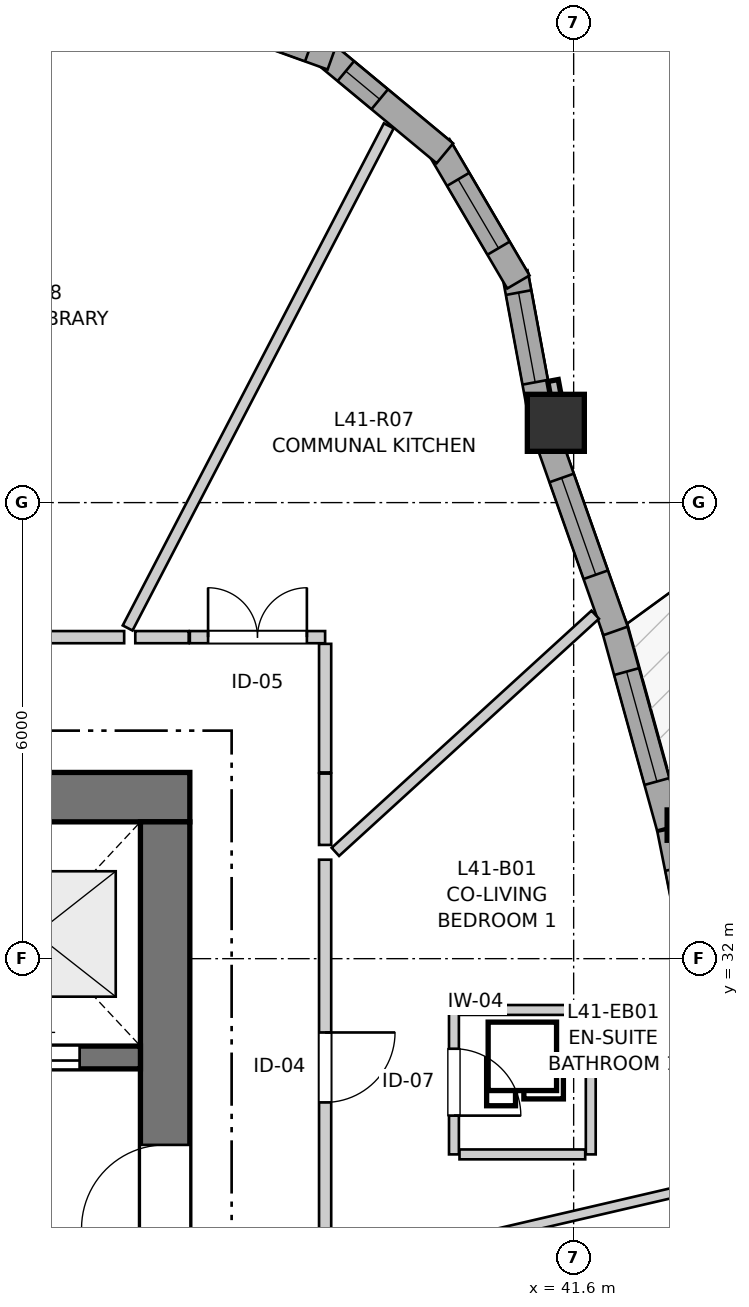
"""IFC4 building model, lengths in metres.
Left out: names, types, materials, properties, quantities, classifications, styles, units other than length and angle.
Written with IfcOpenShell. Run it as: python <this file> out.ifc"""

import sys

from ifc_helpers import new_model, si_unit, direction, frame, frame_2d, origin, origin_2d, place, context, subcontext, project, spatial, rectangle, i_section, extrude, source, transform, mapped, element, fill, save


model = new_model("IFC4")
c1 = context("Model", 3, precision=1e-05, world=origin(), true_north=direction((0.0, 1.0)))
c2 = subcontext(c1, "Body", "Model", "MODEL_VIEW")
j1 = project(units=[si_unit("LENGTHUNIT", "METRE"), si_unit("PLANEANGLEUNIT", "RADIAN")], contexts=[c1])
p1 = place(None, origin())
s1 = spatial("IfcSite", under=j1, at=p1, CompositionType="ELEMENT")
p2 = place(p1, origin())
s2 = spatial("IfcBuilding", under=s1, at=p2, CompositionType="ELEMENT")
p3 = place(p2, frame((0.0, 0.0, 139.4)))
s3 = spatial("IfcBuildingStorey", under=s2, at=p3, CompositionType="ELEMENT", Elevation=139.4)
p4 = place(p3, frame((36.55, 34.125, 0.0), z_axis=(0.0, 0.0, 1.0), x_axis=(-1.0, 0.0, 0.0)))
e1 = element("IfcWall", 1, at=p4, inside=s3, PredefinedType="SHEAR", context=c2, shape_type="SweptSolid", body=[
    extrude(rectangle(XDim=12.4, YDim=0.65, at=frame_2d((6.2, 0.0))), origin(), (0.0, 0.0, 1.0), 2.95),
])
p5 = place(p3, frame((36.225, 18.2, 0.0), z_axis=(0.0, 0.0, 1.0), x_axis=(0.0, 1.0, 0.0)))
e2 = element("IfcWall", 2, at=p5, inside=s3, PredefinedType="SHEAR", context=c2, shape_type="SweptSolid", body=[
    extrude(rectangle(XDim=15.6, YDim=0.65, at=frame_2d((7.8, 0.0))), origin(), (0.0, 0.0, 1.0), 2.95),
])
p6 = place(p5, frame((4.25, 0.0, 0.0)))
e3 = element("IfcOpeningElement", 3, at=p6, cuts=e2, PredefinedType="OPENING", context=c2, shape_type="SweptSolid", body=[
    extrude(rectangle(XDim=1.1, YDim=2.15, at=frame_2d((0.55, 1.075))), frame((0.0, 0.335, 0.0), z_axis=(0.0, -1.0, 0.0), x_axis=(1.0, 0.0, 0.0)), (0.0, 0.0, 1.0), 0.67),
])
p7 = place(p5, frame((10.25, 0.0, 0.0)))
e4 = element("IfcOpeningElement", 4, at=p7, cuts=e2, PredefinedType="OPENING", context=c2, shape_type="SweptSolid", body=[
    extrude(rectangle(XDim=1.1, YDim=2.15, at=frame_2d((0.55, 1.075))), frame((0.0, 0.335, 0.0), z_axis=(0.0, -1.0, 0.0), x_axis=(1.0, 0.0, 0.0)), (0.0, 0.0, 1.0), 0.67),
])
p8 = place(p3, frame((24.8, 30.7, 0.0), z_axis=(0.0, 0.0, 1.0), x_axis=(1.0, 0.0, 0.0)))
e5 = element("IfcWall", 5, at=p8, inside=s3, PredefinedType="SHEAR", context=c2, shape_type="SweptSolid", body=[
    extrude(rectangle(XDim=11.1, YDim=0.3, at=frame_2d((5.55, 0.0))), origin(), (0.0, 0.0, 1.0), 2.95),
])
p9 = place(p8, frame((6.22, 0.0, 0.0)))
e6 = element("IfcOpeningElement", 6, at=p9, cuts=e5, PredefinedType="OPENING", context=c2, shape_type="SweptSolid", body=[
    extrude(rectangle(XDim=0.98, YDim=2.15, at=frame_2d((0.49, 1.075))), frame((0.0, 0.16, 0.0), z_axis=(0.0, -1.0, 0.0), x_axis=(1.0, 0.0, 0.0)), (0.0, 0.0, 1.0), 0.32),
])
p10 = place(p8, frame((9.15, 0.0, 0.0)))
e7 = element("IfcOpeningElement", 7, at=p10, cuts=e5, PredefinedType="OPENING", context=c2, shape_type="SweptSolid", body=[
    extrude(rectangle(XDim=1.15, YDim=2.15, at=frame_2d((0.575, 1.075))), frame((0.0, 0.16, 0.0), z_axis=(0.0, -1.0, 0.0), x_axis=(1.0, 0.0, 0.0)), (0.0, 0.0, 1.0), 0.32),
])
m1 = source(origin(), c2, "Body", "SweptSolid", [
    extrude(i_section(OverallWidth=0.401, OverallDepth=0.399, WebThickness=0.023, FlangeThickness=0.036, FilletRadius=0.015, at=origin_2d()), origin(), (0.0, 0.0, 1.0), 2.95),
])
p11 = place(p3, frame((43.031, 33.757, 0.0), z_axis=(0.0, 0.0, 1.0), x_axis=(1.0, 0.0, 0.0)))
e8 = element("IfcColumn", 8, at=p11, inside=s3, PredefinedType="PILASTER", context=c2, shape_type="MappedRepresentation", body=[
    mapped(m1, transform((0.0, 0.0, 0.0), x_axis=(1.0, 0.0, 0.0), y_axis=(0.0, 1.0, 0.0), z_axis=(0.0, 0.0, 1.0), scale=1.0)),
])
m2 = source(origin(), c2, "Body", "SweptSolid", [
    extrude(rectangle(XDim=0.75, YDim=0.75, at=origin_2d()), origin(), (0.0, 0.0, 1.0), 2.95),
])
p12 = place(p3, frame((41.365, 39.05, 0.0), z_axis=(0.0, 0.0, 1.0), x_axis=(1.0, 0.0, 0.0)))
e9 = element("IfcColumn", 9, at=p12, inside=s3, PredefinedType="COLUMN", context=c2, shape_type="MappedRepresentation", body=[
    mapped(m2, transform((0.0, 0.0, 0.0), x_axis=(1.0, 0.0, 0.0), y_axis=(0.0, 1.0, 0.0), z_axis=(0.0, 0.0, 1.0), scale=1.0)),
])
p13 = place(p3, frame((43.401, 31.037, 0.0), z_axis=(0.0, 0.0, 1.0), x_axis=(-0.196047084538, 0.980594483283, 0.0)))
e10 = element("IfcWall", 10, at=p13, inside=s3, PredefinedType="SOLIDWALL", context=c2, shape_type="SweptSolid", body=[
    extrude(rectangle(XDim=2.72, YDim=0.34, at=frame_2d((1.36, 0.0))), origin(), (0.0, 0.0, 1.0), 2.53),
])
p14 = place(p13, frame((0.545, 0.0, 0.82)))
e11 = element("IfcOpeningElement", 11, at=p14, cuts=e10, PredefinedType="OPENING", context=c2, shape_type="SweptSolid", body=[
    extrude(rectangle(XDim=1.65, YDim=1.45, at=frame_2d((0.825, 0.725))), frame((0.0, 0.18, 0.0), z_axis=(0.0, -1.0, 0.0), x_axis=(1.0, 0.0, 0.0)), (0.0, 0.0, 1.0), 0.36),
])
p15 = place(p3, frame((42.861, 33.731, 0.0), z_axis=(0.0, 0.0, 1.0), x_axis=(-0.266277078362, 0.96389652844, 0.0)))
e12 = element("IfcWall", 12, at=p15, inside=s3, PredefinedType="SOLIDWALL", context=c2, shape_type="SweptSolid", body=[
    extrude(rectangle(XDim=2.764, YDim=0.34, at=frame_2d((1.382, 0.0))), origin(), (0.0, 0.0, 1.0), 2.53),
])
p16 = place(p15, frame((0.622, 0.0, 0.82)))
e13 = element("IfcOpeningElement", 13, at=p16, cuts=e12, PredefinedType="OPENING", context=c2, shape_type="SweptSolid", body=[
    extrude(rectangle(XDim=1.5, YDim=1.45, at=frame_2d((0.75, 0.725))), frame((0.0, 0.18, 0.0), z_axis=(0.0, -1.0, 0.0), x_axis=(1.0, 0.0, 0.0)), (0.0, 0.0, 1.0), 0.36),
])
p17 = place(p3, frame((42.151, 36.312, 0.0), z_axis=(0.0, 0.0, 1.0), x_axis=(-0.332691841861, 0.94303559761, 0.0)))
e14 = element("IfcWall", 14, at=p17, inside=s3, PredefinedType="SOLIDWALL", context=c2, shape_type="SweptSolid", body=[
    extrude(rectangle(XDim=2.688, YDim=0.34, at=frame_2d((1.344, 0.0))), origin(), (0.0, 0.0, 1.0), 2.53),
])
p18 = place(p17, frame((0.784, 0.0, 0.82)))
e15 = element("IfcOpeningElement", 15, at=p18, cuts=e14, PredefinedType="OPENING", context=c2, shape_type="SweptSolid", body=[
    extrude(rectangle(XDim=1.35, YDim=1.45, at=frame_2d((0.675, 0.725))), frame((0.0, 0.18, 0.0), z_axis=(0.0, -1.0, 0.0), x_axis=(1.0, 0.0, 0.0)), (0.0, 0.0, 1.0), 0.36),
])
p19 = place(p3, frame((41.17, 39.171, 0.0), z_axis=(0.0, 0.0, 1.0), x_axis=(-0.182297593262, 0.983243401956, 0.0)))
e16 = element("IfcWall", 16, at=p19, inside=s3, PredefinedType="SOLIDWALL", context=c2, shape_type="SweptSolid", body=[
    extrude(rectangle(XDim=1.888, YDim=0.34, at=frame_2d((0.944, 0.0))), origin(), (0.0, 0.0, 1.0), 2.53),
])
p20 = place(p19, frame((0.419, 0.0, 0.82)))
e17 = element("IfcOpeningElement", 17, at=p20, cuts=e16, PredefinedType="OPENING", context=c2, shape_type="SweptSolid", body=[
    extrude(rectangle(XDim=1.2, YDim=1.45, at=frame_2d((0.6, 0.725))), frame((0.0, 0.18, 0.0), z_axis=(0.0, -1.0, 0.0), x_axis=(1.0, 0.0, 0.0)), (0.0, 0.0, 1.0), 0.36),
])
p21 = place(p3, frame((40.873, 40.902, 0.0), z_axis=(0.0, 0.0, 1.0), x_axis=(-0.506225227923, 0.862401309493, 0.0)))
e18 = element("IfcWall", 18, at=p21, inside=s3, PredefinedType="SOLIDWALL", context=c2, shape_type="SweptSolid", body=[
    extrude(rectangle(XDim=2.081, YDim=0.34, at=frame_2d((1.041, 0.0))), origin(), (0.0, 0.0, 1.0), 2.53),
])
p22 = place(p21, frame((0.516, 0.0, 0.82)))
e19 = element("IfcOpeningElement", 19, at=p22, cuts=e18, PredefinedType="OPENING", context=c2, shape_type="SweptSolid", body=[
    extrude(rectangle(XDim=1.05, YDim=1.45, at=frame_2d((0.525, 0.725))), frame((0.0, 0.18, 0.0), z_axis=(0.0, -1.0, 0.0), x_axis=(1.0, 0.0, 0.0)), (0.0, 0.0, 1.0), 0.36),
])
p23 = place(p3, frame((39.906, 42.595, 0.0), z_axis=(0.0, 0.0, 1.0), x_axis=(-0.769584999316, 0.638544382817, 0.0)))
e20 = element("IfcWall", 20, at=p23, inside=s3, PredefinedType="SOLIDWALL", context=c2, shape_type="SweptSolid", body=[
    extrude(rectangle(XDim=2.081, YDim=0.34, at=frame_2d((1.041, 0.0))), origin(), (0.0, 0.0, 1.0), 2.53),
])
p24 = place(p23, frame((1.114, 0.0, 0.82)))
e21 = element("IfcOpeningElement", 21, at=p24, cuts=e20, PredefinedType="OPENING", context=c2, shape_type="SweptSolid", body=[
    extrude(rectangle(XDim=0.58, YDim=1.35, at=frame_2d((0.29, 0.675))), frame((0.0, 0.18, 0.0), z_axis=(0.0, -1.0, 0.0), x_axis=(1.0, 0.0, 0.0)), (0.0, 0.0, 1.0), 0.36),
])
p25 = place(p3, frame((38.42, 43.858, 0.0), z_axis=(0.0, 0.0, 1.0), x_axis=(-0.941071215914, 0.338208466153, 0.0)))
e22 = element("IfcWall", 22, at=p25, inside=s3, PredefinedType="SOLIDWALL", context=c2, shape_type="SweptSolid", body=[
    extrude(rectangle(XDim=2.081, YDim=0.34, at=frame_2d((1.041, 0.0))), origin(), (0.0, 0.0, 1.0), 2.53),
])
p26 = place(p25, frame((0.316, 0.0, 0.82)))
e23 = element("IfcOpeningElement", 23, at=p26, cuts=e22, PredefinedType="OPENING", context=c2, shape_type="SweptSolid", body=[
    extrude(rectangle(XDim=1.45, YDim=1.25, at=frame_2d((0.725, 0.625))), frame((0.0, 0.18, 0.0), z_axis=(0.0, -1.0, 0.0), x_axis=(1.0, 0.0, 0.0)), (0.0, 0.0, 1.0), 0.36),
])
p27 = place(p3, frame((30.078, 36.23, 0.0), z_axis=(0.0, 0.0, 1.0), x_axis=(1.0, 0.0, 0.0)))
e24 = element("IfcWall", 24, at=p27, inside=s3, PredefinedType="PARTITIONING", context=c2, shape_type="SweptSolid", body=[
    extrude(rectangle(XDim=5.608, YDim=0.16, at=frame_2d((2.804, 0.0))), origin(), (0.0, 0.0, 1.0), 2.588),
])
p28 = place(p27, frame((2.323, 0.0, 0.0)))
e25 = element("IfcOpeningElement", 25, at=p28, cuts=e24, PredefinedType="OPENING", context=c2, shape_type="SweptSolid", body=[
    extrude(rectangle(XDim=0.96, YDim=2.1, at=frame_2d((0.48, 1.05))), frame((0.0, 0.09, 0.0), z_axis=(0.0, -1.0, 0.0), x_axis=(1.0, 0.0, 0.0)), (0.0, 0.0, 1.0), 0.18),
])
p29 = place(p3, frame((38.33, 33.302, 0.0), z_axis=(0.0, 0.0, 1.0), x_axis=(0.0, -1.0, 0.0)))
e26 = element("IfcWall", 26, at=p29, inside=s3, PredefinedType="PARTITIONING", context=c2, shape_type="SweptSolid", body=[
    extrude(rectangle(XDim=5.462, YDim=0.16, at=frame_2d((2.731, 0.0))), origin(), (0.0, 0.0, 1.0), 2.588),
])
p30 = place(p29, frame((2.273, 0.0, 0.0)))
e27 = element("IfcOpeningElement", 27, at=p30, cuts=e26, PredefinedType="OPENING", context=c2, shape_type="SweptSolid", body=[
    extrude(rectangle(XDim=0.92, YDim=2.1, at=frame_2d((0.46, 1.05))), frame((0.0, 0.09, 0.0), z_axis=(0.0, -1.0, 0.0), x_axis=(1.0, 0.0, 0.0)), (0.0, 0.0, 1.0), 0.18),
])
p31 = place(p3, frame((40.025, 31.325, 0.0), z_axis=(0.0, 0.0, 1.0), x_axis=(0.0, -1.0, 0.0)))
e28 = element("IfcWall", 28, at=p31, inside=s3, PredefinedType="PARTITIONING", context=c2, shape_type="SweptSolid", body=[
    extrude(rectangle(XDim=1.9, YDim=0.13, at=frame_2d((0.95, 0.0))), origin(), (0.0, 0.0, 1.0), 2.95),
])
p32 = place(p31, frame((0.51, 0.0, 0.0)))
e29 = element("IfcOpeningElement", 29, at=p32, cuts=e28, PredefinedType="OPENING", context=c2, shape_type="SweptSolid", body=[
    extrude(rectangle(XDim=0.88, YDim=2.05, at=frame_2d((0.44, 1.025))), frame((0.0, 0.075, 0.0), z_axis=(0.0, -1.0, 0.0), x_axis=(1.0, 0.0, 0.0)), (0.0, 0.0, 1.0), 0.15),
])
p33 = place(p3, frame((36.55, 36.23, 0.0), z_axis=(0.0, 0.0, 1.0), x_axis=(1.0, 0.0, 0.0)))
e30 = element("IfcWall", 30, at=p33, inside=s3, PredefinedType="PARTITIONING", context=c2, shape_type="SweptSolid", body=[
    extrude(rectangle(XDim=1.78, YDim=0.16, at=frame_2d((0.89, 0.0))), origin(), (0.0, 0.0, 1.0), 2.95),
])
p34 = place(p33, frame((0.24, 0.0, 0.0)))
e31 = element("IfcOpeningElement", 31, at=p34, cuts=e30, PredefinedType="OPENING", context=c2, shape_type="SweptSolid", body=[
    extrude(rectangle(XDim=1.3, YDim=2.1, at=frame_2d((0.65, 1.05))), frame((0.0, 0.09, 0.0), z_axis=(0.0, -1.0, 0.0), x_axis=(1.0, 0.0, 0.0)), (0.0, 0.0, 1.0), 0.18),
])
p35 = place(p3, frame((35.732, 36.351, 0.0), z_axis=(0.0, 0.0, 1.0), x_axis=(0.461386804, 0.887199085378, 0.0)))
e32 = element("IfcWall", 32, at=p35, inside=s3, PredefinedType="PARTITIONING", context=c2, shape_type="SweptSolid", body=[
    extrude(rectangle(XDim=7.446, YDim=0.145, at=frame_2d((3.723, 0.0))), origin(), (0.0, 0.0, 1.0), 2.95),
])
p36 = place(p3, frame((38.433, 27.88, 0.0), z_axis=(0.0, 0.0, 1.0), x_axis=(0.974013368575, 0.226490524828, 0.0)))
e33 = element("IfcWall", 33, at=p36, inside=s3, PredefinedType="PARTITIONING", context=c2, shape_type="SweptSolid", body=[
    extrude(rectangle(XDim=5.159, YDim=0.13, at=frame_2d((2.58, 0.0))), origin(), (0.0, 0.0, 1.0), 2.95),
])
p37 = place(p3, frame((38.465, 33.405, 0.0), z_axis=(0.0, 0.0, 1.0), x_axis=(0.738623645331, 0.674118024205, 0.0)))
e34 = element("IfcWall", 34, at=p37, inside=s3, PredefinedType="PARTITIONING", context=c2, shape_type="SweptSolid", body=[
    extrude(rectangle(XDim=4.629, YDim=0.145, at=frame_2d((2.314, 0.0))), origin(), (0.0, 0.0, 1.0), 2.95),
])
p38 = place(p3, frame((41.825, 29.425, 0.0), z_axis=(0.0, 0.0, 1.0), x_axis=(0.0, 1.0, 0.0)))
e35 = element("IfcWall", 35, at=p38, inside=s3, PredefinedType="PARTITIONING", context=c2, shape_type="SweptSolid", body=[
    extrude(rectangle(XDim=1.9, YDim=0.13, at=frame_2d((0.95, 0.0))), origin(), (0.0, 0.0, 1.0), 2.95),
])
for number, where, z_axis, x_axis in (
    (36, (40.098, 31.325, 0.0), (0.0, 0.0, 1.0), (1.0, 0.0, 0.0)),
    (37, (40.098, 29.425, 0.0), (0.0, 0.0, 1.0), (1.0, 0.0, 0.0)),
):
    element("IfcWall", number, at=place(p3, frame(where, z_axis=z_axis, x_axis=x_axis)), inside=s3, PredefinedType="PARTITIONING", context=c2, shape_type="SweptSolid", body=[
        extrude(rectangle(XDim=1.654, YDim=0.13, at=frame_2d((0.827, 0.0))), origin(), (0.0, 0.0, 1.0), 2.95),
    ])
p39 = place(p3, frame((38.33, 34.45, 0.0), z_axis=(0.0, 0.0, 1.0), x_axis=(0.0, 1.0, 0.0)))
e38 = element("IfcWall", 38, at=p39, inside=s3, PredefinedType="PARTITIONING", context=c2, shape_type="SweptSolid", body=[
    extrude(rectangle(XDim=1.692, YDim=0.16, at=frame_2d((0.846, 0.0))), origin(), (0.0, 0.0, 1.0), 2.588),
])
p40 = place(p3, frame((38.33, 33.496, 0.0), z_axis=(0.0, 0.0, 1.0), x_axis=(0.0, 1.0, 0.0)))
e39 = element("IfcWall", 39, at=p40, inside=s3, PredefinedType="PARTITIONING", context=c2, shape_type="SweptSolid", body=[
    extrude(rectangle(XDim=0.939, YDim=0.16, at=frame_2d((0.469, 0.0))), origin(), (0.0, 0.0, 1.0), 2.588),
])
p41 = place(p3, frame((35.832, 36.23, 0.0), z_axis=(0.0, 0.0, 1.0), x_axis=(1.0, 0.0, 0.0)))
e40 = element("IfcWall", 40, at=p41, inside=s3, PredefinedType="PARTITIONING", context=c2, shape_type="SweptSolid", body=[
    extrude(rectangle(XDim=0.703, YDim=0.16, at=frame_2d((0.351, 0.0))), origin(), (0.0, 0.0, 1.0), 2.95),
])
m3 = source(origin(), c2, "Body", "SweptSolid", [
    extrude(rectangle(XDim=1.5, YDim=1.45, at=frame_2d((0.75, 0.725))), frame((0.0, 0.03, 0.0), z_axis=(0.0, -1.0, 0.0), x_axis=(1.0, 0.0, 0.0)), (0.0, 0.0, 1.0), 0.06),
])
p42 = place(p16, origin())
e41 = element("IfcWindow", 41, at=p42, inside=s3, PartitioningType="SINGLE_PANEL", PredefinedType="WINDOW", context=c2, shape_type="MappedRepresentation", body=[
    mapped(m3, transform((0.0, 0.0, 0.0), x_axis=(1.0, 0.0, 0.0), y_axis=(0.0, 1.0, 0.0), z_axis=(0.0, 0.0, 1.0), scale=1.0)),
])
fill(e13, e41)
m4 = source(origin(), c2, "Body", "SweptSolid", [
    extrude(rectangle(XDim=1.35, YDim=1.45, at=frame_2d((0.675, 0.725))), frame((0.0, 0.03, 0.0), z_axis=(0.0, -1.0, 0.0), x_axis=(1.0, 0.0, 0.0)), (0.0, 0.0, 1.0), 0.06),
])
p43 = place(p18, origin())
e42 = element("IfcWindow", 42, at=p43, inside=s3, PartitioningType="SINGLE_PANEL", PredefinedType="WINDOW", context=c2, shape_type="MappedRepresentation", body=[
    mapped(m4, transform((0.0, 0.0, 0.0), x_axis=(1.0, 0.0, 0.0), y_axis=(0.0, 1.0, 0.0), z_axis=(0.0, 0.0, 1.0), scale=1.0)),
])
fill(e15, e42)
m5 = source(origin(), c2, "Body", "SweptSolid", [
    extrude(rectangle(XDim=1.2, YDim=1.45, at=frame_2d((0.6, 0.725))), frame((0.0, 0.03, 0.0), z_axis=(0.0, -1.0, 0.0), x_axis=(1.0, 0.0, 0.0)), (0.0, 0.0, 1.0), 0.06),
])
p44 = place(p20, origin())
e43 = element("IfcWindow", 43, at=p44, inside=s3, PartitioningType="SINGLE_PANEL", PredefinedType="WINDOW", context=c2, shape_type="MappedRepresentation", body=[
    mapped(m5, transform((0.0, 0.0, 0.0), x_axis=(1.0, 0.0, 0.0), y_axis=(0.0, 1.0, 0.0), z_axis=(0.0, 0.0, 1.0), scale=1.0)),
])
fill(e17, e43)
m6 = source(origin(), c2, "Body", "SweptSolid", [
    extrude(rectangle(XDim=1.05, YDim=1.45, at=frame_2d((0.525, 0.725))), frame((0.0, 0.03, 0.0), z_axis=(0.0, -1.0, 0.0), x_axis=(1.0, 0.0, 0.0)), (0.0, 0.0, 1.0), 0.06),
])
p45 = place(p22, origin())
e44 = element("IfcWindow", 44, at=p45, inside=s3, PartitioningType="SINGLE_PANEL", PredefinedType="WINDOW", context=c2, shape_type="MappedRepresentation", body=[
    mapped(m6, transform((0.0, 0.0, 0.0), x_axis=(1.0, 0.0, 0.0), y_axis=(0.0, 1.0, 0.0), z_axis=(0.0, 0.0, 1.0), scale=1.0)),
])
fill(e19, e44)
m7 = source(origin(), c2, "Body", "SweptSolid", [
    extrude(rectangle(XDim=0.58, YDim=1.35, at=frame_2d((0.29, 0.675))), frame((0.0, 0.03, 0.0), z_axis=(0.0, -1.0, 0.0), x_axis=(1.0, 0.0, 0.0)), (0.0, 0.0, 1.0), 0.06),
])
p46 = place(p24, origin())
e45 = element("IfcWindow", 45, at=p46, inside=s3, PartitioningType="SINGLE_PANEL", PredefinedType="WINDOW", context=c2, shape_type="MappedRepresentation", body=[
    mapped(m7, transform((0.0, 0.0, 0.0), x_axis=(1.0, 0.0, 0.0), y_axis=(0.0, 1.0, 0.0), z_axis=(0.0, 0.0, 1.0), scale=1.0)),
])
fill(e21, e45)
m8 = source(origin(), c2, "Body", "SweptSolid", [
    extrude(rectangle(XDim=1.15, YDim=2.15, at=frame_2d((0.575, 1.075))), frame((0.0, 0.025, 0.0), z_axis=(0.0, -1.0, 0.0), x_axis=(1.0, 0.0, 0.0)), (0.0, 0.0, 1.0), 0.05),
])
p47 = place(p10, origin())
e46 = element("IfcDoor", 46, at=p47, inside=s3, OperationType="DOUBLE_DOOR_SLIDING", PredefinedType="DOOR", context=c2, shape_type="MappedRepresentation", body=[
    mapped(m8, transform((0.0, 0.0, 0.0), x_axis=(1.0, 0.0, 0.0), y_axis=(0.0, 1.0, 0.0), z_axis=(0.0, 0.0, 1.0), scale=1.0)),
])
fill(e7, e46)
m9 = source(origin(), c2, "Body", "SweptSolid", [
    extrude(rectangle(XDim=1.1, YDim=2.15, at=frame_2d((0.55, 1.075))), frame((0.0, 0.025, 0.0), z_axis=(0.0, -1.0, 0.0), x_axis=(1.0, 0.0, 0.0)), (0.0, 0.0, 1.0), 0.05),
])
p48 = place(p7, origin())
e47 = element("IfcDoor", 47, at=p48, inside=s3, OperationType="SINGLE_SWING_LEFT", PredefinedType="DOOR", context=c2, shape_type="MappedRepresentation", body=[
    mapped(m9, transform((0.0, 0.0, 0.0), x_axis=(1.0, 0.0, 0.0), y_axis=(0.0, 1.0, 0.0), z_axis=(0.0, 0.0, 1.0), scale=1.0)),
])
fill(e4, e47)
m10 = source(origin(), c2, "Body", "SweptSolid", [
    extrude(rectangle(XDim=0.92, YDim=2.1, at=frame_2d((0.46, 1.05))), frame((0.0, 0.025, 0.0), z_axis=(0.0, -1.0, 0.0), x_axis=(1.0, 0.0, 0.0)), (0.0, 0.0, 1.0), 0.05),
])
p49 = place(p30, origin())
e48 = element("IfcDoor", 48, at=p49, inside=s3, OperationType="SINGLE_SWING_LEFT", PredefinedType="DOOR", context=c2, shape_type="MappedRepresentation", body=[
    mapped(m10, transform((0.0, 0.0, 0.0), x_axis=(1.0, 0.0, 0.0), y_axis=(0.0, 1.0, 0.0), z_axis=(0.0, 0.0, 1.0), scale=1.0)),
])
fill(e27, e48)
m11 = source(origin(), c2, "Body", "SweptSolid", [
    extrude(rectangle(XDim=0.88, YDim=2.05, at=frame_2d((0.44, 1.025))), frame((0.0, 0.025, 0.0), z_axis=(0.0, -1.0, 0.0), x_axis=(1.0, 0.0, 0.0)), (0.0, 0.0, 1.0), 0.05),
])
p50 = place(p32, origin())
e49 = element("IfcDoor", 49, at=p50, inside=s3, OperationType="SINGLE_SWING_RIGHT", PredefinedType="DOOR", context=c2, shape_type="MappedRepresentation", body=[
    mapped(m11, transform((0.0, 0.0, 0.0), x_axis=(1.0, 0.0, 0.0), y_axis=(0.0, 1.0, 0.0), z_axis=(0.0, 0.0, 1.0), scale=1.0)),
])
fill(e29, e49)
m12 = source(origin(), c2, "Body", "SweptSolid", [
    extrude(rectangle(XDim=1.3, YDim=2.1, at=frame_2d((0.65, 1.05))), frame((0.0, 0.025, 0.0), z_axis=(0.0, -1.0, 0.0), x_axis=(1.0, 0.0, 0.0)), (0.0, 0.0, 1.0), 0.05),
])
p51 = place(p34, origin())
e50 = element("IfcDoor", 50, at=p51, inside=s3, OperationType="DOUBLE_DOOR_SINGLE_SWING", PredefinedType="DOOR", context=c2, shape_type="MappedRepresentation", body=[
    mapped(m12, transform((0.0, 0.0, 0.0), x_axis=(1.0, 0.0, 0.0), y_axis=(0.0, 1.0, 0.0), z_axis=(0.0, 0.0, 1.0), scale=1.0)),
])
fill(e31, e50)
save(model, sys.argv[1])
